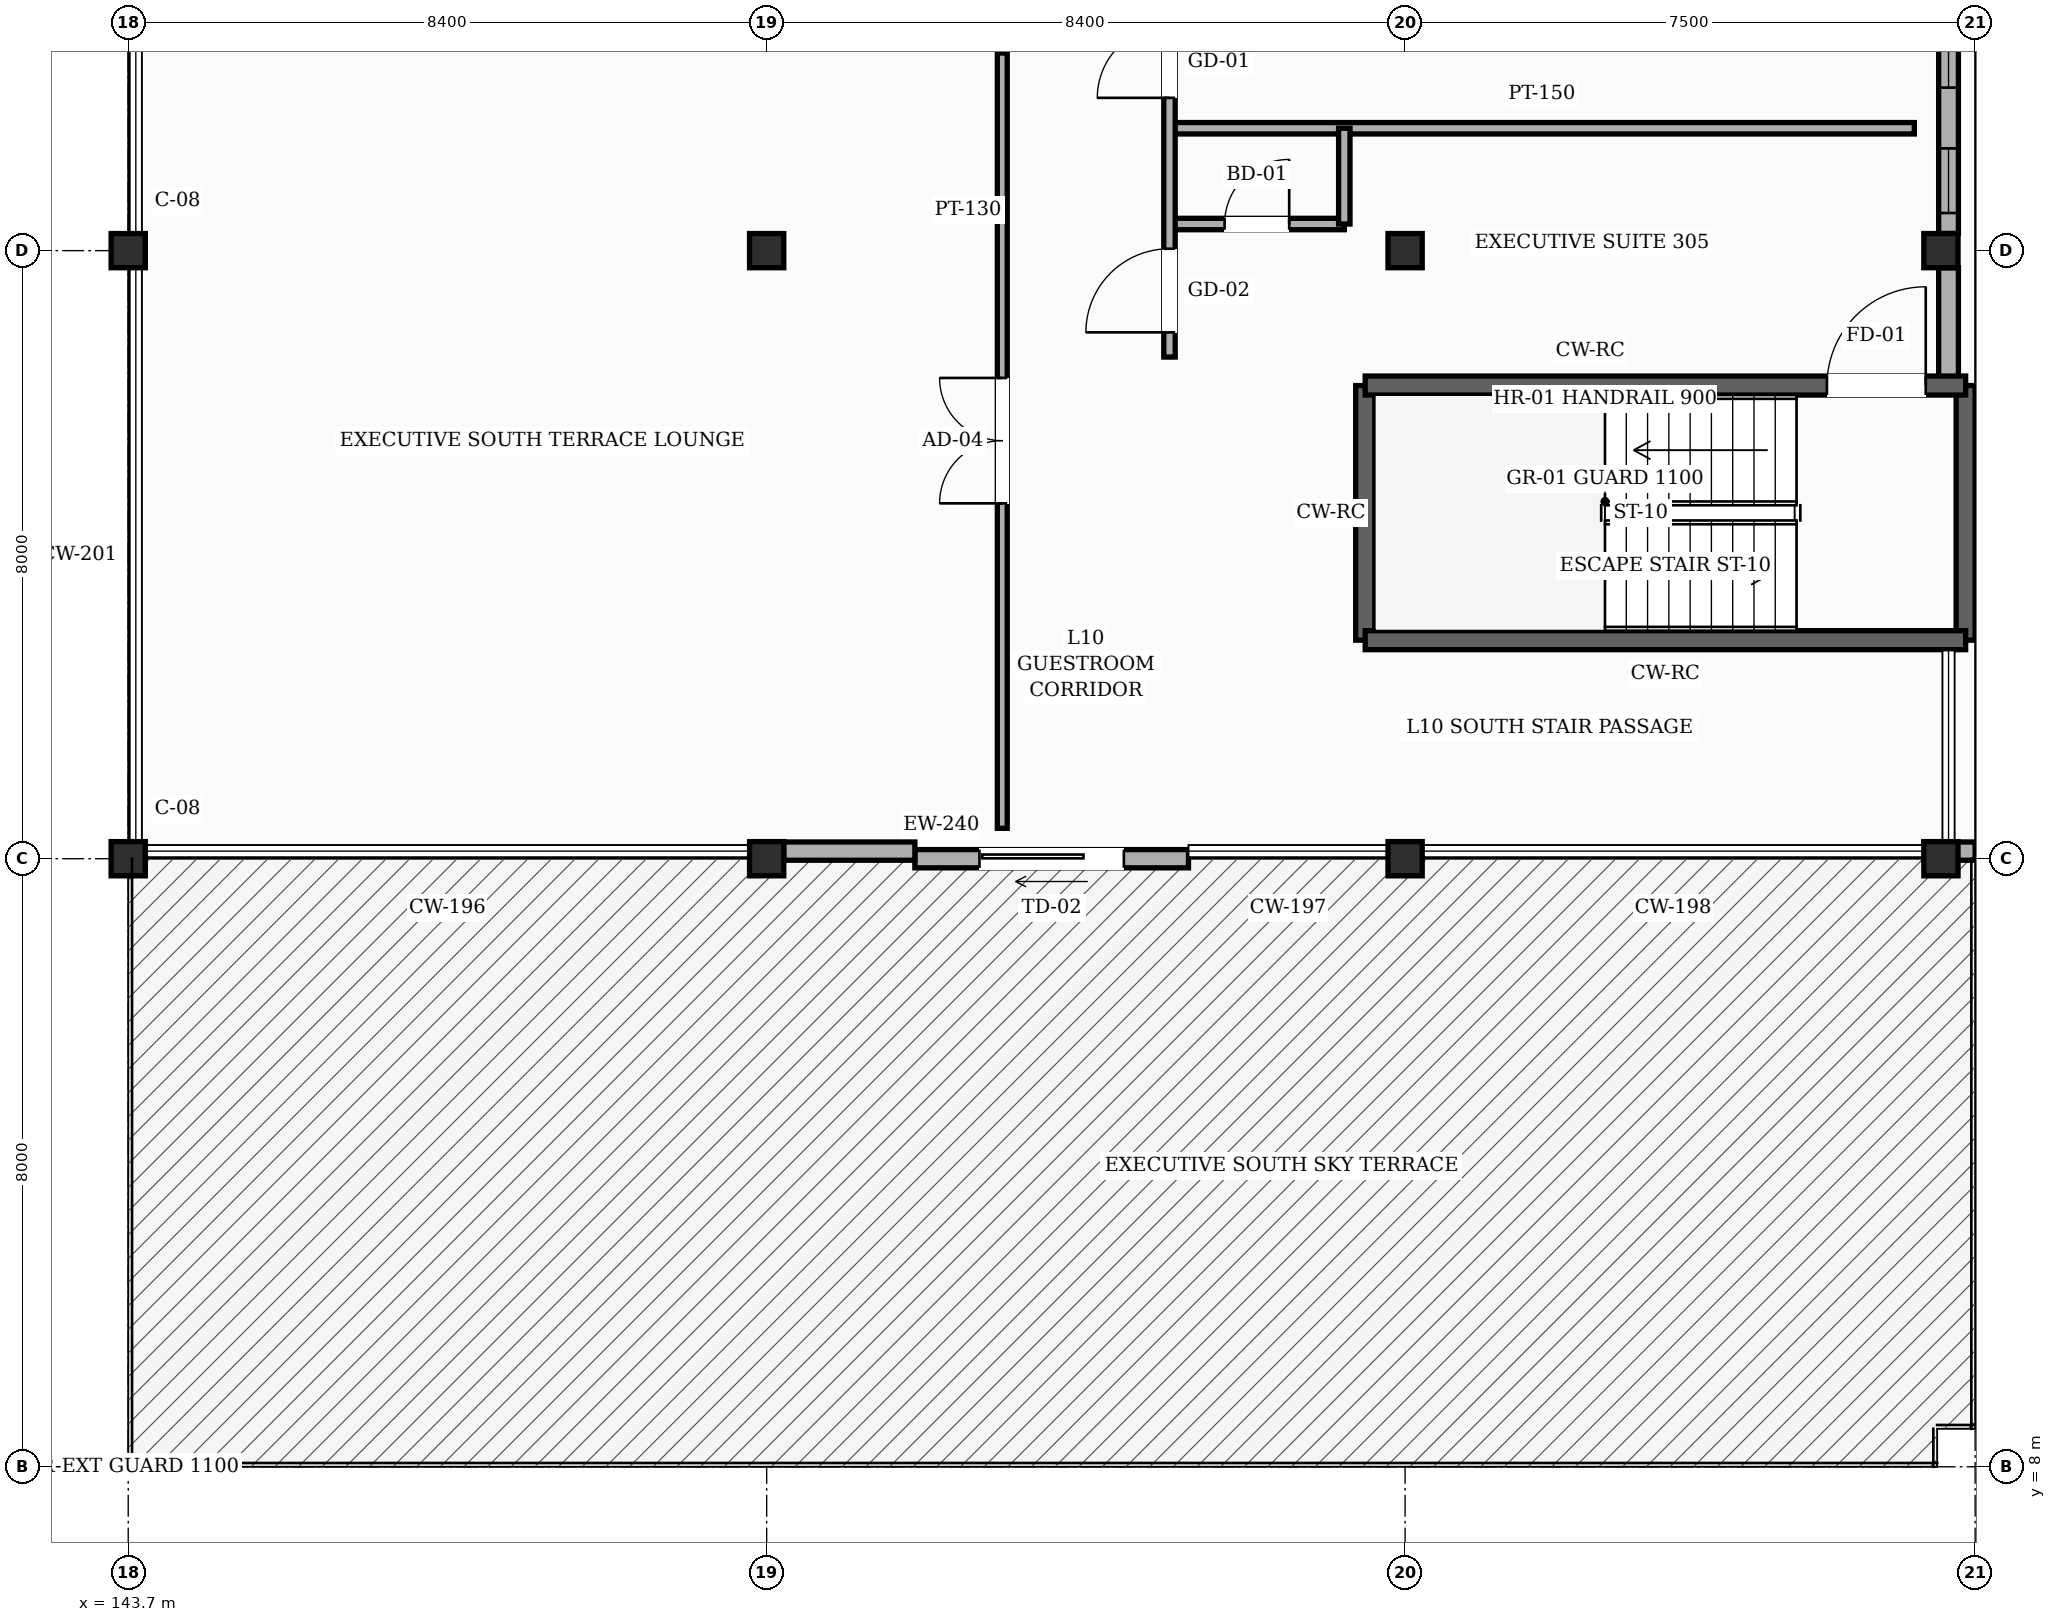
"""IFC4 building model, lengths in metres.
Left out: names, types, materials, properties, quantities, classifications, styles, units other than length and angle.
Written with IfcOpenShell. Run it as: python <this file> out.ifc"""

import sys

from ifc_helpers import new_model, si_unit, direction, frame, frame_2d, origin, origin_2d, place, context, subcontext, project, spatial, rectangle, hollow_rectangle, extrude, element, fill, save


model = new_model("IFC4")
c1 = context("Model", 3, precision=1e-05, world=origin(), true_north=direction((0.0, 1.0)))
c2 = subcontext(c1, "Body", "Model", "MODEL_VIEW")
j1 = project(units=[si_unit("LENGTHUNIT", "METRE"), si_unit("PLANEANGLEUNIT", "RADIAN")], contexts=[c1])
p1 = place(None, origin())
s1 = spatial("IfcSite", under=j1, at=p1, CompositionType="ELEMENT")
p2 = place(p1, origin())
s2 = spatial("IfcBuilding", under=s1, at=p2, CompositionType="ELEMENT")
p3 = place(p2, frame((0.0, 0.0, 42.6)))
s3 = spatial("IfcBuildingStorey", under=s2, at=p3, CompositionType="ELEMENT", Elevation=42.6)
for number, where, z_axis, x_axis in (
    (1, (143.7, 16.0, 0.0), (0.0, 0.0, 1.0), (1.0, 0.0, 0.0)),
    (2, (143.7, 24.0, 0.0), (0.0, 0.0, 1.0), (1.0, 0.0, 0.0)),
    (3, (152.1, 16.0, 0.0), (0.0, 0.0, 1.0), (1.0, 0.0, 0.0)),
    (4, (152.1, 24.0, 0.0), (0.0, 0.0, 1.0), (1.0, 0.0, 0.0)),
    (5, (160.5, 16.0, 0.0), (0.0, 0.0, 1.0), (1.0, 0.0, 0.0)),
    (6, (160.5, 24.0, 0.0), (0.0, 0.0, 1.0), (1.0, 0.0, 0.0)),
    (7, (167.55, 16.0, 0.0), (0.0, 0.0, 1.0), (1.0, 0.0, 0.0)),
    (8, (167.55, 24.0, 0.0), (0.0, 0.0, 1.0), (1.0, 0.0, 0.0)),
):
    element("IfcColumn", number, at=place(p3, frame(where, z_axis=z_axis, x_axis=x_axis)), inside=s3, PredefinedType="COLUMN", context=c2, shape_type="SweptSolid", body=[
        extrude(hollow_rectangle(XDim=0.45, YDim=0.45, WallThickness=0.019, InnerFilletRadius=0.019, OuterFilletRadius=0.038, at=origin_2d()), origin(), (0.0, 0.0, 1.0), 3.6),
    ])
p4 = place(p3, frame((167.65, 23.775, 0.0), z_axis=(0.0, 0.0, 1.0), x_axis=(0.0, -1.0, 0.0)))
e9 = element("IfcWall", 9, at=p4, inside=s3, PredefinedType="SOLIDWALL", context=c2, shape_type="SweptSolid", body=[
    extrude(rectangle(XDim=1.55, YDim=0.26, at=frame_2d((0.775, 0.0))), origin(), (0.0, 0.0, 1.0), 3.365),
])
p5 = place(p3, frame((167.65, 31.775, 0.0), z_axis=(0.0, 0.0, 1.0), x_axis=(0.0, -1.0, 0.0)))
e10 = element("IfcWall", 10, at=p5, inside=s3, PredefinedType="SOLIDWALL", context=c2, shape_type="SweptSolid", body=[
    extrude(rectangle(XDim=7.55, YDim=0.26, at=frame_2d((3.775, 0.0))), origin(), (0.0, 0.0, 1.0), 2.755),
])
p6 = place(p5, frame((6.43, 0.0, 0.85)))
e11 = element("IfcOpeningElement", 11, at=p6, cuts=e10, PredefinedType="OPENING", context=c2, shape_type="SweptSolid", body=[
    extrude(rectangle(XDim=0.85, YDim=1.35, at=frame_2d((0.425, 0.675))), frame((0.0, 0.14, 0.0), z_axis=(0.0, -1.0, 0.0), x_axis=(1.0, 0.0, 0.0)), (0.0, 0.0, 1.0), 0.28),
])
p7 = place(p5, frame((3.68, 0.0, 0.85)))
e12 = element("IfcOpeningElement", 12, at=p7, cuts=e10, PredefinedType="OPENING", context=c2, shape_type="SweptSolid", body=[
    extrude(rectangle(XDim=1.95, YDim=1.5, at=frame_2d((0.975, 0.75))), frame((0.0, 0.14, 0.0), z_axis=(0.0, -1.0, 0.0), x_axis=(1.0, 0.0, 0.0)), (0.0, 0.0, 1.0), 0.28),
])
p8 = place(p5, frame((0.515, 0.0, 0.85)))
e13 = element("IfcOpeningElement", 13, at=p8, cuts=e10, PredefinedType="OPENING", context=c2, shape_type="SweptSolid", body=[
    extrude(rectangle(XDim=2.25, YDim=1.5, at=frame_2d((1.125, 0.75))), frame((0.0, 0.14, 0.0), z_axis=(0.0, -1.0, 0.0), x_axis=(1.0, 0.0, 0.0)), (0.0, 0.0, 1.0), 0.28),
])
p9 = place(p3, frame((154.05, 16.0, 0.0), z_axis=(0.0, 0.0, 1.0), x_axis=(1.0, 0.0, 0.0)))
e14 = element("IfcWall", 14, at=p9, inside=s3, PredefinedType="SOLIDWALL", context=c2, shape_type="SweptSolid", body=[
    extrude(rectangle(XDim=3.6, YDim=0.24, at=frame_2d((1.8, 0.0))), origin(), (0.0, 0.0, 1.0), 2.755),
])
p10 = place(p9, frame((0.85, 0.0, 0.0)))
e15 = element("IfcOpeningElement", 15, at=p10, cuts=e14, PredefinedType="OPENING", context=c2, shape_type="SweptSolid", body=[
    extrude(rectangle(XDim=1.9, YDim=2.35, at=frame_2d((0.95, 1.175))), frame((0.0, 0.13, 0.0), z_axis=(0.0, -1.0, 0.0), x_axis=(1.0, 0.0, 0.0)), (0.0, 0.0, 1.0), 0.26),
])
p11 = place(p3, frame((154.05, 16.1, 0.0), z_axis=(0.0, 0.0, 1.0), x_axis=(-1.0, 0.0, 0.0)))
e16 = element("IfcWall", 16, at=p11, inside=s3, PredefinedType="SOLIDWALL", context=c2, shape_type="SweptSolid", body=[
    extrude(rectangle(XDim=1.725, YDim=0.24, at=frame_2d((0.863, 0.0))), origin(), (0.0, 0.0, 1.0), 2.755),
])
p12 = place(p3, frame((168.0, 16.1, 0.0), z_axis=(0.0, 0.0, 1.0), x_axis=(-1.0, 0.0, 0.0)))
e17 = element("IfcWall", 17, at=p12, inside=s3, PredefinedType="SOLIDWALL", context=c2, shape_type="SweptSolid", body=[
    extrude(rectangle(XDim=0.675, YDim=0.24, at=frame_2d((0.337, 0.0))), origin(), (0.0, 0.0, 1.0), 3.365),
])
for number, where, z_axis, x_axis in (
    (18, (167.875, 22.225, 0.0), (0.0, 0.0, 1.0), (0.0, -1.0, 0.0)),
    (19, (159.975, 18.875, 0.0), (0.0, 0.0, 1.0), (0.0, 1.0, 0.0)),
):
    element("IfcWall", number, at=place(p3, frame(where, z_axis=z_axis, x_axis=x_axis)), inside=s3, PredefinedType="SHEAR", context=c2, shape_type="SweptSolid", body=[
        extrude(rectangle(XDim=3.35, YDim=0.25, at=frame_2d((1.675, 0.0))), origin(), (0.0, 0.0, 1.0), 3.38),
    ])
p13 = place(p3, frame((159.975, 22.225, 0.0), z_axis=(0.0, 0.0, 1.0), x_axis=(1.0, 0.0, 0.0)))
e20 = element("IfcWall", 20, at=p13, inside=s3, PredefinedType="SHEAR", context=c2, shape_type="SweptSolid", body=[
    extrude(rectangle(XDim=7.9, YDim=0.25, at=frame_2d((3.95, 0.0))), origin(), (0.0, 0.0, 1.0), 3.38),
])
p14 = place(p13, frame((6.075, 0.0, 0.0)))
e21 = element("IfcOpeningElement", 21, at=p14, cuts=e20, PredefinedType="OPENING", context=c2, shape_type="SweptSolid", body=[
    extrude(rectangle(XDim=1.3, YDim=2.2, at=frame_2d((0.65, 1.1))), frame((0.0, 0.135, 0.0), z_axis=(0.0, -1.0, 0.0), x_axis=(1.0, 0.0, 0.0)), (0.0, 0.0, 1.0), 0.27),
])
p15 = place(p3, frame((167.875, 18.875, 0.0), z_axis=(0.0, 0.0, 1.0), x_axis=(-1.0, 0.0, 0.0)))
e22 = element("IfcWall", 22, at=p15, inside=s3, PredefinedType="SHEAR", context=c2, shape_type="SweptSolid", body=[
    extrude(rectangle(XDim=7.9, YDim=0.25, at=frame_2d((3.95, 0.0))), origin(), (0.0, 0.0, 1.0), 3.38),
])
p16 = place(p3, frame((157.4, 24.35, 0.0), z_axis=(0.0, 0.0, 1.0), x_axis=(1.0, 0.0, 0.0)))
e23 = element("IfcWall", 23, at=p16, inside=s3, PredefinedType="PARTITIONING", context=c2, shape_type="SweptSolid", body=[
    extrude(rectangle(XDim=2.3, YDim=0.15, at=frame_2d((1.15, 0.0))), origin(), (0.0, 0.0, 1.0), 3.365),
])
p17 = place(p16, frame((0.725, 0.0, 0.0)))
e24 = element("IfcOpeningElement", 24, at=p17, cuts=e23, PredefinedType="OPENING", context=c2, shape_type="SweptSolid", body=[
    extrude(rectangle(XDim=0.85, YDim=2.1, at=frame_2d((0.425, 1.05))), frame((0.0, 0.085, 0.0), z_axis=(0.0, -1.0, 0.0), x_axis=(1.0, 0.0, 0.0)), (0.0, 0.0, 1.0), 0.17),
])
p18 = place(p3, frame((157.4, 25.61, 0.0), z_axis=(0.0, 0.0, 1.0), x_axis=(1.0, 0.0, 0.0)))
e25 = element("IfcWall", 25, at=p18, inside=s3, PredefinedType="PARTITIONING", context=c2, shape_type="SweptSolid", body=[
    extrude(rectangle(XDim=9.8, YDim=0.15, at=frame_2d((4.9, 0.0))), origin(), (0.0, 0.0, 1.0), 3.365),
])
p19 = place(p3, frame((155.2, 16.4, 0.0), z_axis=(0.0, 0.0, 1.0), x_axis=(0.0, 1.0, 0.0)))
e26 = element("IfcWall", 26, at=p19, inside=s3, PredefinedType="PARTITIONING", context=c2, shape_type="SweptSolid", body=[
    extrude(rectangle(XDim=10.2, YDim=0.13, at=frame_2d((5.1, 0.0))), origin(), (0.0, 0.0, 1.0), 3.365),
])
p20 = place(p19, frame((4.275, 0.0, 0.0)))
e27 = element("IfcOpeningElement", 27, at=p20, cuts=e26, PredefinedType="OPENING", context=c2, shape_type="SweptSolid", body=[
    extrude(rectangle(XDim=1.65, YDim=2.35, at=frame_2d((0.825, 1.175))), frame((0.0, 0.075, 0.0), z_axis=(0.0, -1.0, 0.0), x_axis=(1.0, 0.0, 0.0)), (0.0, 0.0, 1.0), 0.15),
])
p21 = place(p3, frame((157.4, 22.6, 0.0), z_axis=(0.0, 0.0, 1.0), x_axis=(0.0, 1.0, 0.0)))
e28 = element("IfcWall", 28, at=p21, inside=s3, PredefinedType="PARTITIONING", context=c2, shape_type="SweptSolid", body=[
    extrude(rectangle(XDim=48.2, YDim=0.15, at=frame_2d((24.1, 0.0))), origin(), (0.0, 0.0, 1.0), 3.365),
])
p22 = place(p21, frame((0.325, 0.0, 0.0)))
e29 = element("IfcOpeningElement", 29, at=p22, cuts=e28, PredefinedType="OPENING", context=c2, shape_type="SweptSolid", body=[
    extrude(rectangle(XDim=1.1, YDim=2.2, at=frame_2d((0.55, 1.1))), frame((0.0, 0.085, 0.0), z_axis=(0.0, -1.0, 0.0), x_axis=(1.0, 0.0, 0.0)), (0.0, 0.0, 1.0), 0.17),
])
p23 = place(p21, frame((3.41, 0.0, 0.0)))
e30 = element("IfcOpeningElement", 30, at=p23, cuts=e28, PredefinedType="OPENING", context=c2, shape_type="SweptSolid", body=[
    extrude(rectangle(XDim=0.95, YDim=2.15, at=frame_2d((0.475, 1.075))), frame((0.0, 0.085, 0.0), z_axis=(0.0, -1.0, 0.0), x_axis=(1.0, 0.0, 0.0)), (0.0, 0.0, 1.0), 0.17),
])
p24 = place(p21, frame((6.425, 0.0, 0.0)))
e31 = element("IfcOpeningElement", 31, at=p24, cuts=e28, PredefinedType="OPENING", context=c2, shape_type="SweptSolid", body=[
    extrude(rectangle(XDim=0.95, YDim=2.15, at=frame_2d((0.475, 1.075))), frame((0.0, 0.085, 0.0), z_axis=(0.0, -1.0, 0.0), x_axis=(1.0, 0.0, 0.0)), (0.0, 0.0, 1.0), 0.17),
])
p25 = place(p21, frame((9.44, 0.0, 0.0)))
e32 = element("IfcOpeningElement", 32, at=p25, cuts=e28, PredefinedType="OPENING", context=c2, shape_type="SweptSolid", body=[
    extrude(rectangle(XDim=0.95, YDim=2.15, at=frame_2d((0.475, 1.075))), frame((0.0, 0.085, 0.0), z_axis=(0.0, -1.0, 0.0), x_axis=(1.0, 0.0, 0.0)), (0.0, 0.0, 1.0), 0.17),
])
p26 = place(p21, frame((12.45, 0.0, 0.0)))
e33 = element("IfcOpeningElement", 33, at=p26, cuts=e28, PredefinedType="OPENING", context=c2, shape_type="SweptSolid", body=[
    extrude(rectangle(XDim=0.95, YDim=2.15, at=frame_2d((0.475, 1.075))), frame((0.0, 0.085, 0.0), z_axis=(0.0, -1.0, 0.0), x_axis=(1.0, 0.0, 0.0)), (0.0, 0.0, 1.0), 0.17),
])
p27 = place(p21, frame((15.46, 0.0, 0.0)))
e34 = element("IfcOpeningElement", 34, at=p27, cuts=e28, PredefinedType="OPENING", context=c2, shape_type="SweptSolid", body=[
    extrude(rectangle(XDim=0.95, YDim=2.15, at=frame_2d((0.475, 1.075))), frame((0.0, 0.085, 0.0), z_axis=(0.0, -1.0, 0.0), x_axis=(1.0, 0.0, 0.0)), (0.0, 0.0, 1.0), 0.17),
])
p28 = place(p21, frame((18.475, 0.0, 0.0)))
e35 = element("IfcOpeningElement", 35, at=p28, cuts=e28, PredefinedType="OPENING", context=c2, shape_type="SweptSolid", body=[
    extrude(rectangle(XDim=0.95, YDim=2.15, at=frame_2d((0.475, 1.075))), frame((0.0, 0.085, 0.0), z_axis=(0.0, -1.0, 0.0), x_axis=(1.0, 0.0, 0.0)), (0.0, 0.0, 1.0), 0.17),
])
p29 = place(p21, frame((21.49, 0.0, 0.0)))
e36 = element("IfcOpeningElement", 36, at=p29, cuts=e28, PredefinedType="OPENING", context=c2, shape_type="SweptSolid", body=[
    extrude(rectangle(XDim=0.95, YDim=2.15, at=frame_2d((0.475, 1.075))), frame((0.0, 0.085, 0.0), z_axis=(0.0, -1.0, 0.0), x_axis=(1.0, 0.0, 0.0)), (0.0, 0.0, 1.0), 0.17),
])
p30 = place(p21, frame((24.5, 0.0, 0.0)))
e37 = element("IfcOpeningElement", 37, at=p30, cuts=e28, PredefinedType="OPENING", context=c2, shape_type="SweptSolid", body=[
    extrude(rectangle(XDim=0.95, YDim=2.15, at=frame_2d((0.475, 1.075))), frame((0.0, 0.085, 0.0), z_axis=(0.0, -1.0, 0.0), x_axis=(1.0, 0.0, 0.0)), (0.0, 0.0, 1.0), 0.17),
])
p31 = place(p21, frame((27.51, 0.0, 0.0)))
e38 = element("IfcOpeningElement", 38, at=p31, cuts=e28, PredefinedType="OPENING", context=c2, shape_type="SweptSolid", body=[
    extrude(rectangle(XDim=0.95, YDim=2.15, at=frame_2d((0.475, 1.075))), frame((0.0, 0.085, 0.0), z_axis=(0.0, -1.0, 0.0), x_axis=(1.0, 0.0, 0.0)), (0.0, 0.0, 1.0), 0.17),
])
p32 = place(p21, frame((30.525, 0.0, 0.0)))
e39 = element("IfcOpeningElement", 39, at=p32, cuts=e28, PredefinedType="OPENING", context=c2, shape_type="SweptSolid", body=[
    extrude(rectangle(XDim=0.95, YDim=2.15, at=frame_2d((0.475, 1.075))), frame((0.0, 0.085, 0.0), z_axis=(0.0, -1.0, 0.0), x_axis=(1.0, 0.0, 0.0)), (0.0, 0.0, 1.0), 0.17),
])
p33 = place(p21, frame((33.54, 0.0, 0.0)))
e40 = element("IfcOpeningElement", 40, at=p33, cuts=e28, PredefinedType="OPENING", context=c2, shape_type="SweptSolid", body=[
    extrude(rectangle(XDim=0.95, YDim=2.15, at=frame_2d((0.475, 1.075))), frame((0.0, 0.085, 0.0), z_axis=(0.0, -1.0, 0.0), x_axis=(1.0, 0.0, 0.0)), (0.0, 0.0, 1.0), 0.17),
])
p34 = place(p21, frame((36.55, 0.0, 0.0)))
e41 = element("IfcOpeningElement", 41, at=p34, cuts=e28, PredefinedType="OPENING", context=c2, shape_type="SweptSolid", body=[
    extrude(rectangle(XDim=0.95, YDim=2.15, at=frame_2d((0.475, 1.075))), frame((0.0, 0.085, 0.0), z_axis=(0.0, -1.0, 0.0), x_axis=(1.0, 0.0, 0.0)), (0.0, 0.0, 1.0), 0.17),
])
p35 = place(p21, frame((39.56, 0.0, 0.0)))
e42 = element("IfcOpeningElement", 42, at=p35, cuts=e28, PredefinedType="OPENING", context=c2, shape_type="SweptSolid", body=[
    extrude(rectangle(XDim=0.95, YDim=2.15, at=frame_2d((0.475, 1.075))), frame((0.0, 0.085, 0.0), z_axis=(0.0, -1.0, 0.0), x_axis=(1.0, 0.0, 0.0)), (0.0, 0.0, 1.0), 0.17),
])
p36 = place(p21, frame((42.575, 0.0, 0.0)))
e43 = element("IfcOpeningElement", 43, at=p36, cuts=e28, PredefinedType="OPENING", context=c2, shape_type="SweptSolid", body=[
    extrude(rectangle(XDim=0.95, YDim=2.15, at=frame_2d((0.475, 1.075))), frame((0.0, 0.085, 0.0), z_axis=(0.0, -1.0, 0.0), x_axis=(1.0, 0.0, 0.0)), (0.0, 0.0, 1.0), 0.17),
])
p37 = place(p21, frame((45.585, 0.0, 0.0)))
e44 = element("IfcOpeningElement", 44, at=p37, cuts=e28, PredefinedType="OPENING", context=c2, shape_type="SweptSolid", body=[
    extrude(rectangle(XDim=0.95, YDim=2.15, at=frame_2d((0.475, 1.075))), frame((0.0, 0.085, 0.0), z_axis=(0.0, -1.0, 0.0), x_axis=(1.0, 0.0, 0.0)), (0.0, 0.0, 1.0), 0.17),
])
p38 = place(p3, frame((159.7, 24.35, 0.0), z_axis=(0.0, 0.0, 1.0), x_axis=(0.0, 1.0, 0.0)))
e45 = element("IfcWall", 45, at=p38, inside=s3, PredefinedType="PARTITIONING", context=c2, shape_type="SweptSolid", body=[
    extrude(rectangle(XDim=1.26, YDim=0.15, at=frame_2d((0.63, 0.0))), origin(), (0.0, 0.0, 1.0), 3.365),
])
p39 = place(p6, origin())
e46 = element("IfcWindow", 46, at=p39, inside=s3, PartitioningType="SINGLE_PANEL", PredefinedType="WINDOW", context=c2, shape_type="SweptSolid", body=[
    extrude(rectangle(XDim=0.85, YDim=1.35, at=frame_2d((0.425, 0.675))), frame((0.0, 0.03, 0.0), z_axis=(0.0, -1.0, 0.0), x_axis=(1.0, 0.0, 0.0)), (0.0, 0.0, 1.0), 0.06),
])
fill(e11, e46)
p40 = place(p7, origin())
e47 = element("IfcWindow", 47, at=p40, inside=s3, PartitioningType="SINGLE_PANEL", PredefinedType="WINDOW", context=c2, shape_type="SweptSolid", body=[
    extrude(rectangle(XDim=1.95, YDim=1.5, at=frame_2d((0.975, 0.75))), frame((0.0, 0.03, 0.0), z_axis=(0.0, -1.0, 0.0), x_axis=(1.0, 0.0, 0.0)), (0.0, 0.0, 1.0), 0.06),
])
fill(e12, e47)
p41 = place(p10, origin())
e48 = element("IfcDoor", 48, at=p41, inside=s3, OperationType="SLIDING_TO_LEFT", PredefinedType="DOOR", context=c2, shape_type="SweptSolid", body=[
    extrude(rectangle(XDim=1.9, YDim=2.35, at=frame_2d((0.95, 1.175))), frame((0.0, 0.025, 0.0), z_axis=(0.0, -1.0, 0.0), x_axis=(1.0, 0.0, 0.0)), (0.0, 0.0, 1.0), 0.05),
])
fill(e15, e48)
p42 = place(p14, origin())
e49 = element("IfcDoor", 49, at=p42, inside=s3, OperationType="SINGLE_SWING_RIGHT", PredefinedType="DOOR", context=c2, shape_type="SweptSolid", body=[
    extrude(rectangle(XDim=1.3, YDim=2.2, at=frame_2d((0.65, 1.1))), frame((0.0, 0.025, 0.0), z_axis=(0.0, -1.0, 0.0), x_axis=(1.0, 0.0, 0.0)), (0.0, 0.0, 1.0), 0.05),
])
fill(e21, e49)
p43 = place(p20, origin())
e50 = element("IfcDoor", 50, at=p43, inside=s3, OperationType="DOUBLE_DOOR_SINGLE_SWING", PredefinedType="DOOR", context=c2, shape_type="SweptSolid", body=[
    extrude(rectangle(XDim=1.65, YDim=2.35, at=frame_2d((0.825, 1.175))), frame((0.0, 0.025, 0.0), z_axis=(0.0, -1.0, 0.0), x_axis=(1.0, 0.0, 0.0)), (0.0, 0.0, 1.0), 0.05),
])
fill(e27, e50)
p44 = place(p22, origin())
e51 = element("IfcDoor", 51, at=p44, inside=s3, OperationType="SINGLE_SWING_LEFT", PredefinedType="DOOR", context=c2, shape_type="SweptSolid", body=[
    extrude(rectangle(XDim=1.1, YDim=2.2, at=frame_2d((0.55, 1.1))), frame((0.0, 0.025, 0.0), z_axis=(0.0, -1.0, 0.0), x_axis=(1.0, 0.0, 0.0)), (0.0, 0.0, 1.0), 0.05),
])
fill(e29, e51)
p45 = place(p17, origin())
e52 = element("IfcDoor", 52, at=p45, inside=s3, OperationType="SINGLE_SWING_RIGHT", PredefinedType="DOOR", context=c2, shape_type="SweptSolid", body=[
    extrude(rectangle(XDim=0.85, YDim=2.1, at=frame_2d((0.425, 1.05))), frame((0.0, 0.025, 0.0), z_axis=(0.0, -1.0, 0.0), x_axis=(1.0, 0.0, 0.0)), (0.0, 0.0, 1.0), 0.05),
])
fill(e24, e52)
p46 = place(p23, origin())
e53 = element("IfcDoor", 53, at=p46, inside=s3, OperationType="SINGLE_SWING_LEFT", PredefinedType="DOOR", context=c2, shape_type="SweptSolid", body=[
    extrude(rectangle(XDim=0.95, YDim=2.15, at=frame_2d((0.475, 1.075))), frame((0.0, 0.025, 0.0), z_axis=(0.0, -1.0, 0.0), x_axis=(1.0, 0.0, 0.0)), (0.0, 0.0, 1.0), 0.05),
])
fill(e30, e53)
save(model, sys.argv[1])
